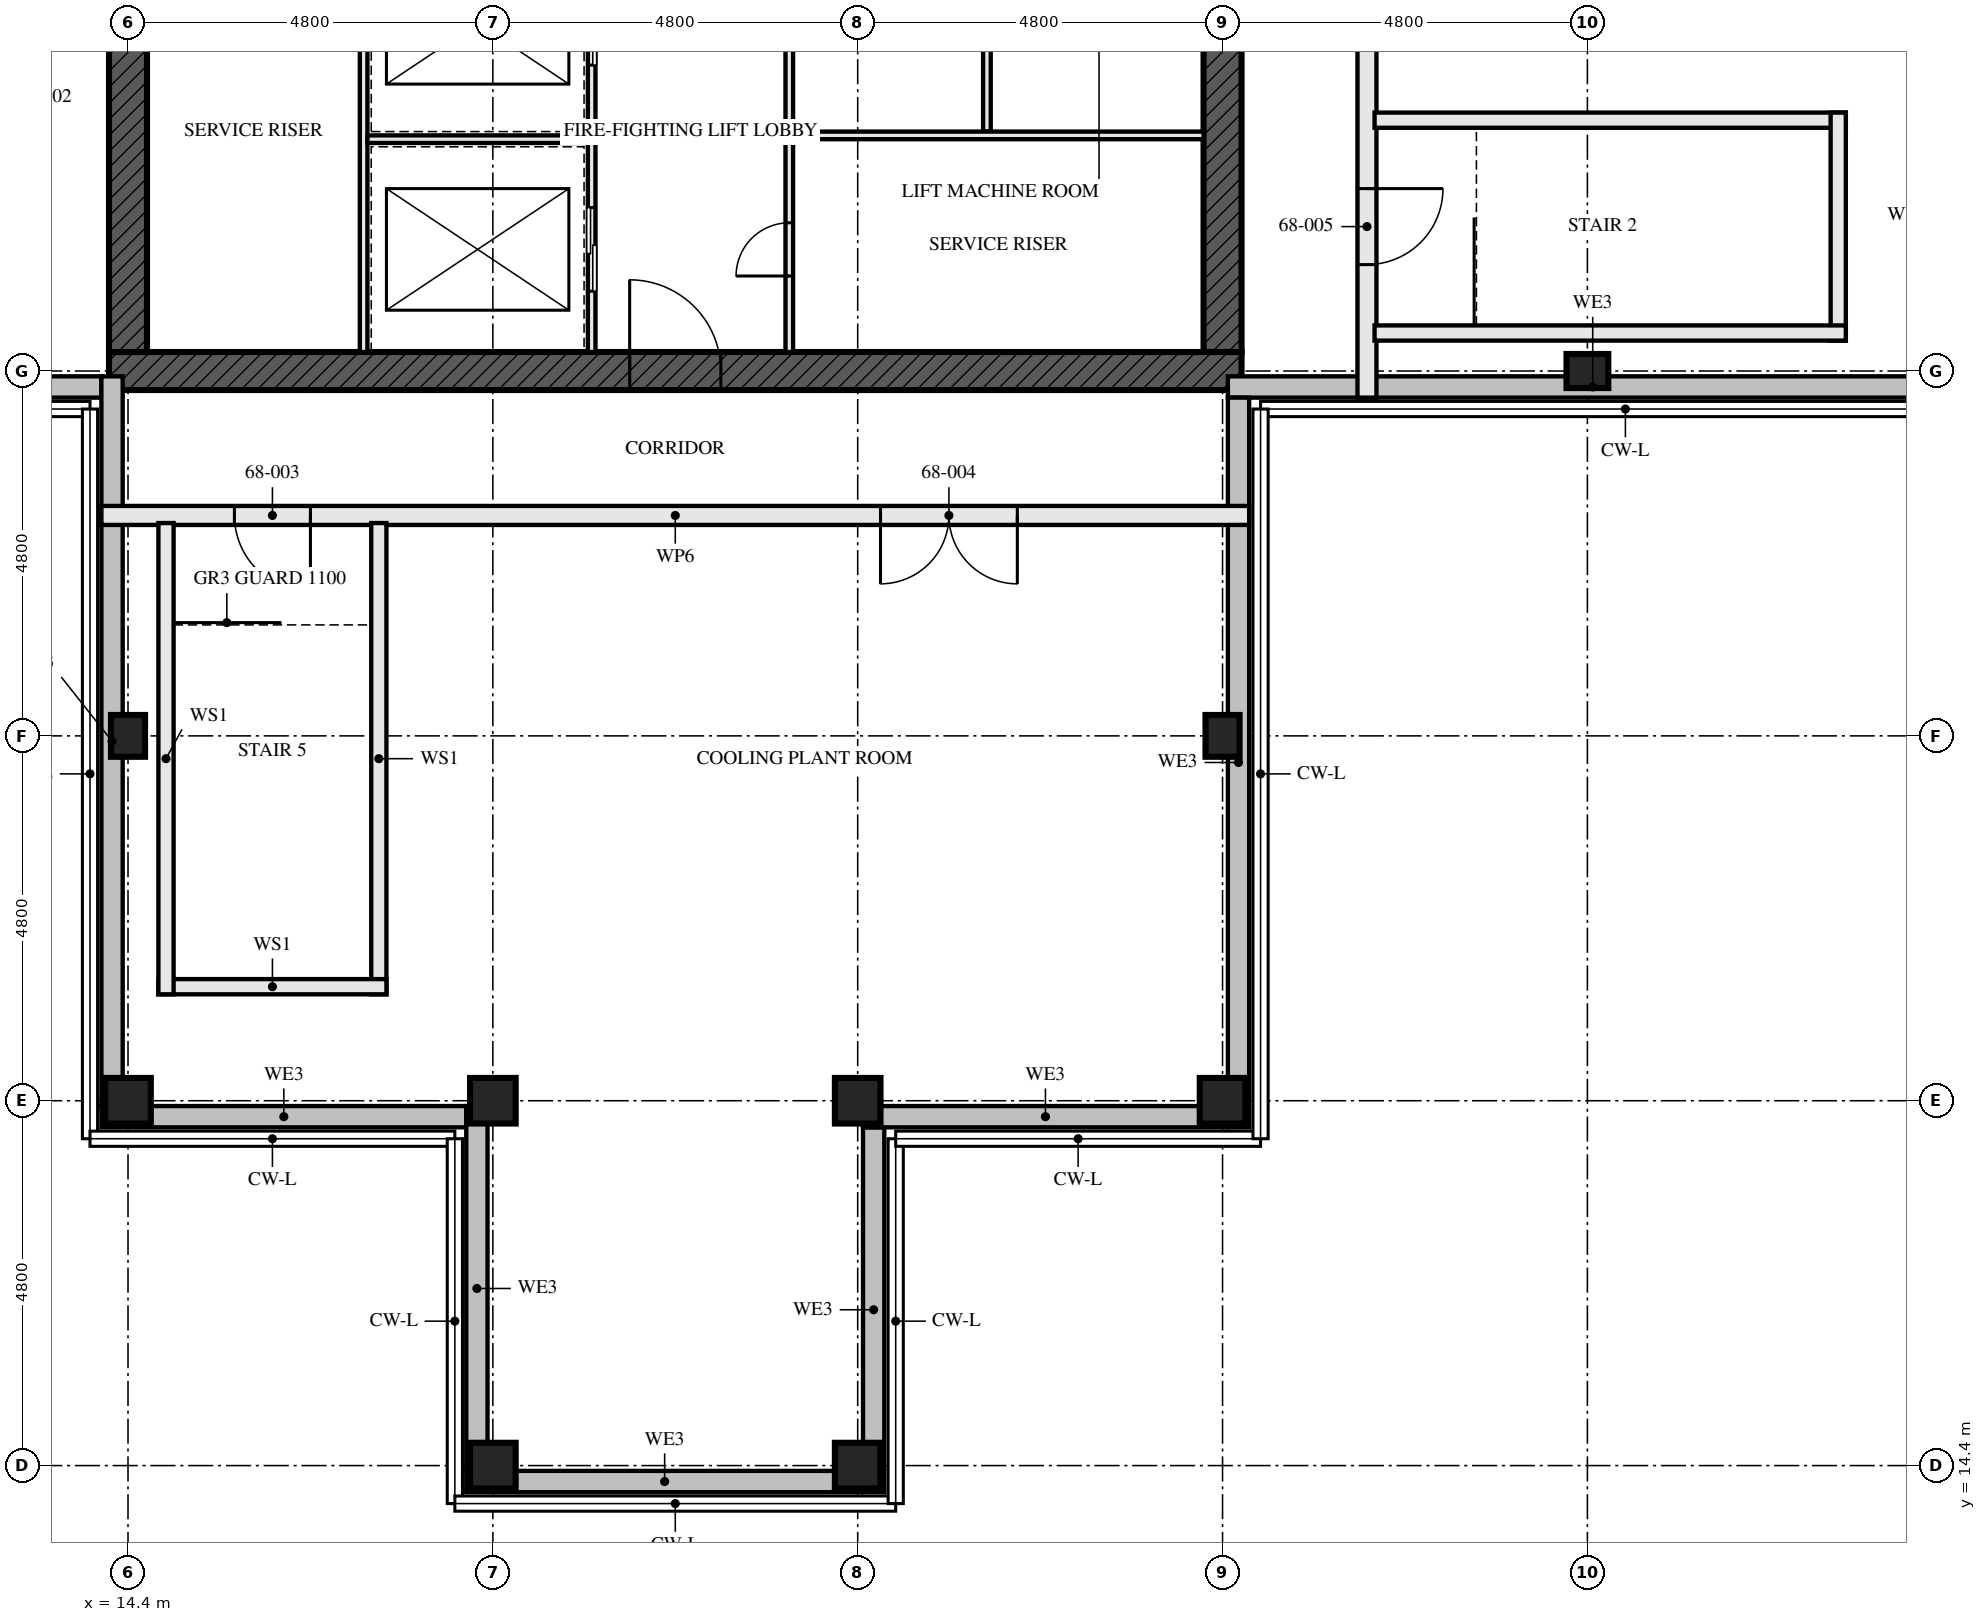
"""IFC4 building model, lengths in metres.
Left out: names, types, materials, properties, quantities, classifications, styles, units other than length and angle.
Written with IfcOpenShell. Run it as: python <this file> out.ifc"""

import sys

from ifc_helpers import new_model, si_unit, direction, frame, frame_2d, origin, origin_2d, place, context, subcontext, project, spatial, rectangle, hollow_rectangle, i_section, extrude, element, fill, save


model = new_model("IFC4")
c1 = context("Model", 3, precision=1e-05, world=origin(), true_north=direction((0.0, 1.0)))
c2 = subcontext(c1, "Body", "Model", "MODEL_VIEW")
j1 = project(units=[si_unit("LENGTHUNIT", "METRE"), si_unit("PLANEANGLEUNIT", "RADIAN")], contexts=[c1])
p1 = place(None, origin())
s1 = spatial("IfcSite", under=j1, at=p1, CompositionType="ELEMENT")
p2 = place(p1, origin())
s2 = spatial("IfcBuilding", under=s1, at=p2, CompositionType="ELEMENT")
p3 = place(p2, frame((0.0, 0.0, 248.0)))
s3 = spatial("IfcBuildingStorey", under=s2, at=p3, CompositionType="ELEMENT", Elevation=248.0)
p4 = place(p3, frame((14.4, 19.2, 0.0), z_axis=(0.0, 0.0, 1.0), x_axis=(0.0, 1.0, 0.0)))
e1 = element("IfcColumn", 1, at=p4, inside=s3, PredefinedType="COLUMN", context=c2, shape_type="SweptSolid", body=[
    extrude(hollow_rectangle(XDim=0.6, YDim=0.6, WallThickness=0.05, at=origin_2d()), origin(), (0.0, 0.0, 1.0), 4.25),
])
p5 = place(p3, frame((14.4, 24.0, 0.0), z_axis=(0.0, 0.0, 1.0), x_axis=(1.0, 0.0, 0.0)))
e2 = element("IfcColumn", 2, at=p5, inside=s3, PredefinedType="COLUMN", context=c2, shape_type="SweptSolid", body=[
    extrude(i_section(OverallWidth=0.448, OverallDepth=0.55, WebThickness=0.072, FlangeThickness=0.115, FilletRadius=0.015, at=origin_2d()), origin(), (0.0, 0.0, 1.0), 4.25),
])
for number, where, z_axis, x_axis in (
    (3, (19.2, 14.4, 0.0), (0.0, 0.0, 1.0), (0.0, 1.0, 0.0)),
    (4, (19.2, 19.2, 0.0), (0.0, 0.0, 1.0), (0.0, 1.0, 0.0)),
    (5, (24.0, 14.4, 0.0), (0.0, 0.0, 1.0), (0.0, 1.0, 0.0)),
    (6, (24.0, 19.2, 0.0), (0.0, 0.0, 1.0), (0.0, 1.0, 0.0)),
    (7, (28.8, 19.2, 0.0), (0.0, 0.0, 1.0), (0.0, 1.0, 0.0)),
):
    element("IfcColumn", number, at=place(p3, frame(where, z_axis=z_axis, x_axis=x_axis)), inside=s3, PredefinedType="COLUMN", context=c2, shape_type="SweptSolid", body=[
        extrude(hollow_rectangle(XDim=0.6, YDim=0.6, WallThickness=0.05, at=origin_2d()), origin(), (0.0, 0.0, 1.0), 4.25),
    ])
for number, where, z_axis, x_axis in (
    (8, (28.8, 24.0, 0.0), (0.0, 0.0, 1.0), (1.0, 0.0, 0.0)),
    (9, (33.6, 28.8, 0.0), (0.0, 0.0, 1.0), (0.0, 1.0, 0.0)),
):
    element("IfcColumn", number, at=place(p3, frame(where, z_axis=z_axis, x_axis=x_axis)), inside=s3, PredefinedType="COLUMN", context=c2, shape_type="SweptSolid", body=[
        extrude(i_section(OverallWidth=0.448, OverallDepth=0.55, WebThickness=0.072, FlangeThickness=0.115, FilletRadius=0.015, at=origin_2d()), origin(), (0.0, 0.0, 1.0), 4.25),
    ])
p6 = place(p3, frame((14.15, 28.8, -0.25), z_axis=(0.0, 0.0, 1.0), x_axis=(1.0, 0.0, 0.0)))
e10 = element("IfcWall", 10, at=p6, inside=s3, PredefinedType="SHEAR", context=c2, shape_type="SweptSolid", body=[
    extrude(rectangle(XDim=14.9, YDim=0.5, at=frame_2d((7.45, 0.0))), origin(), (0.0, 0.0, 1.0), 4.5),
])
p7 = place(p6, frame((6.85, 0.0, 0.25)))
e11 = element("IfcOpeningElement", 11, at=p7, cuts=e10, PredefinedType="OPENING", context=c2, shape_type="SweptSolid", body=[
    extrude(rectangle(XDim=1.2, YDim=2.1, at=frame_2d((0.6, 1.05))), frame((0.0, 0.26, 0.0), z_axis=(0.0, -1.0, 0.0), x_axis=(1.0, 0.0, 0.0)), (0.0, 0.0, 1.0), 0.521),
])
p8 = place(p3, frame((14.4, 42.95, -0.25), z_axis=(0.0, 0.0, 1.0), x_axis=(0.0, -1.0, 0.0)))
e12 = element("IfcWall", 12, at=p8, inside=s3, PredefinedType="SHEAR", context=c2, shape_type="SweptSolid", body=[
    extrude(rectangle(XDim=13.9, YDim=0.5, at=frame_2d((6.95, 0.0))), origin(), (0.0, 0.0, 1.0), 4.5),
])
p9 = place(p8, frame((6.35, 0.0, 0.25)))
e13 = element("IfcOpeningElement", 13, at=p9, cuts=e12, PredefinedType="OPENING", context=c2, shape_type="SweptSolid", body=[
    extrude(rectangle(XDim=1.2, YDim=2.1, at=frame_2d((0.6, 1.05))), frame((0.0, 0.26, 0.0), z_axis=(0.0, -1.0, 0.0), x_axis=(1.0, 0.0, 0.0)), (0.0, 0.0, 1.0), 0.521),
])
p10 = place(p3, frame((28.8, 29.05, -0.25), z_axis=(0.0, 0.0, 1.0), x_axis=(0.0, 1.0, 0.0)))
e14 = element("IfcWall", 14, at=p10, inside=s3, PredefinedType="SHEAR", context=c2, shape_type="SweptSolid", body=[
    extrude(rectangle(XDim=13.9, YDim=0.5, at=frame_2d((6.95, 0.0))), origin(), (0.0, 0.0, 1.0), 4.5),
])
p11 = place(p10, frame((6.35, 0.0, 0.25)))
e15 = element("IfcOpeningElement", 15, at=p11, cuts=e14, PredefinedType="OPENING", context=c2, shape_type="SweptSolid", body=[
    extrude(rectangle(XDim=1.2, YDim=2.1, at=frame_2d((0.6, 1.05))), frame((0.0, 0.26, 0.0), z_axis=(0.0, -1.0, 0.0), x_axis=(1.0, 0.0, 0.0)), (0.0, 0.0, 1.0), 0.521),
])
p12 = place(p3, frame((28.87, 28.59, 4.5), z_axis=(0.0, 0.0, 1.0), x_axis=(1.0, 0.0, 0.0)))
e16 = element("IfcWall", 16, at=p12, inside=s3, PredefinedType="PARAPET", context=c2, shape_type="SweptSolid", body=[
    extrude(rectangle(XDim=9.6, YDim=0.28, at=frame_2d((4.8, 0.0))), origin(), (0.0, 0.0, 1.0), 1.1),
])
for number, where, z_axis, x_axis in (
    (17, (4.45, 28.59, 4.5), (0.0, 0.0, 1.0), (1.0, 0.0, 0.0)),
    (18, (14.19, 28.73, 4.5), (0.0, 0.0, 1.0), (0.0, -1.0, 0.0)),
):
    element("IfcWall", number, at=place(p3, frame(where, z_axis=z_axis, x_axis=x_axis)), inside=s3, PredefinedType="PARAPET", context=c2, shape_type="SweptSolid", body=[
        extrude(rectangle(XDim=9.6, YDim=0.28, at=frame_2d((4.8, 0.0))), origin(), (0.0, 0.0, 1.0), 1.1),
    ])
p13 = place(p3, frame((14.05, 18.99, 4.5), z_axis=(0.0, 0.0, 1.0), x_axis=(1.0, 0.0, 0.0)))
e19 = element("IfcWall", 19, at=p13, inside=s3, PredefinedType="PARAPET", context=c2, shape_type="SweptSolid", body=[
    extrude(rectangle(XDim=4.8, YDim=0.28, at=frame_2d((2.4, 0.0))), origin(), (0.0, 0.0, 1.0), 1.1),
])
p14 = place(p3, frame((18.99, 19.13, 4.5), z_axis=(0.0, 0.0, 1.0), x_axis=(0.0, -1.0, 0.0)))
e20 = element("IfcWall", 20, at=p14, inside=s3, PredefinedType="PARAPET", context=c2, shape_type="SweptSolid", body=[
    extrude(rectangle(XDim=4.8, YDim=0.28, at=frame_2d((2.4, 0.0))), origin(), (0.0, 0.0, 1.0), 1.1),
])
p15 = place(p3, frame((18.85, 14.19, 4.5), z_axis=(0.0, 0.0, 1.0), x_axis=(1.0, 0.0, 0.0)))
e21 = element("IfcWall", 21, at=p15, inside=s3, PredefinedType="PARAPET", context=c2, shape_type="SweptSolid", body=[
    extrude(rectangle(XDim=5.22, YDim=0.28, at=frame_2d((2.61, 0.0))), origin(), (0.0, 0.0, 1.0), 1.1),
])
for number, where, z_axis, x_axis in (
    (22, (24.21, 14.05, 4.5), (0.0, 0.0, 1.0), (0.0, 1.0, 0.0)),
    (23, (24.07, 18.99, 4.5), (0.0, 0.0, 1.0), (1.0, 0.0, 0.0)),
):
    element("IfcWall", number, at=place(p3, frame(where, z_axis=z_axis, x_axis=x_axis)), inside=s3, PredefinedType="PARAPET", context=c2, shape_type="SweptSolid", body=[
        extrude(rectangle(XDim=4.8, YDim=0.28, at=frame_2d((2.4, 0.0))), origin(), (0.0, 0.0, 1.0), 1.1),
    ])
p16 = place(p3, frame((29.01, 18.85, 4.5), z_axis=(0.0, 0.0, 1.0), x_axis=(0.0, 1.0, 0.0)))
e24 = element("IfcWall", 24, at=p16, inside=s3, PredefinedType="PARAPET", context=c2, shape_type="SweptSolid", body=[
    extrude(rectangle(XDim=9.6, YDim=0.28, at=frame_2d((4.8, 0.0))), origin(), (0.0, 0.0, 1.0), 1.1),
])
for number, where, z_axis, x_axis in (
    (25, (14.9, 20.6, 0.0), (0.0, 0.0, 1.0), (0.0, 1.0, 0.0)),
    (26, (17.7, 20.6, 0.0), (0.0, 0.0, 1.0), (0.0, 1.0, 0.0)),
):
    element("IfcWall", number, at=place(p3, frame(where, z_axis=z_axis, x_axis=x_axis)), inside=s3, PredefinedType="SOLIDWALL", context=c2, shape_type="SweptSolid", body=[
        extrude(rectangle(XDim=6.2, YDim=0.2, at=frame_2d((3.1, 0.0))), origin(), (0.0, 0.0, 1.0), 3.478),
    ])
p17 = place(p3, frame((14.8, 20.7, 0.0), z_axis=(0.0, 0.0, 1.0), x_axis=(1.0, 0.0, 0.0)))
e27 = element("IfcWall", 27, at=p17, inside=s3, PredefinedType="SOLIDWALL", context=c2, shape_type="SweptSolid", body=[
    extrude(rectangle(XDim=3.0, YDim=0.2, at=frame_2d((1.5, 0.0))), origin(), (0.0, 0.0, 1.0), 4.25),
])
p18 = place(p3, frame((14.05, 26.9, 0.0), z_axis=(0.0, 0.0, 1.0), x_axis=(1.0, 0.0, 0.0)))
e28 = element("IfcWall", 28, at=p18, inside=s3, PredefinedType="SOLIDWALL", context=c2, shape_type="SweptSolid", body=[
    extrude(rectangle(XDim=15.1, YDim=0.25, at=frame_2d((7.55, 0.0))), origin(), (0.0, 0.0, 1.0), 3.34),
])
p19 = place(p18, frame((1.75, 0.0, 0.0)))
e29 = element("IfcOpeningElement", 29, at=p19, cuts=e28, PredefinedType="OPENING", context=c2, shape_type="SweptSolid", body=[
    extrude(rectangle(XDim=1.0, YDim=2.1, at=frame_2d((0.5, 1.05))), frame((0.0, 0.135, 0.0), z_axis=(0.0, -1.0, 0.0), x_axis=(1.0, 0.0, 0.0)), (0.0, 0.0, 1.0), 0.271),
])
p20 = place(p18, frame((10.25, 0.0, 0.0)))
e30 = element("IfcOpeningElement", 30, at=p20, cuts=e28, PredefinedType="OPENING", context=c2, shape_type="SweptSolid", body=[
    extrude(rectangle(XDim=1.8, YDim=2.4, at=frame_2d((0.9, 1.2))), frame((0.0, 0.135, 0.0), z_axis=(0.0, -1.0, 0.0), x_axis=(1.0, 0.0, 0.0)), (0.0, 0.0, 1.0), 0.271),
])
for number, where, z_axis, x_axis in (
    (31, (37.0, 29.3, 0.0), (0.0, 0.0, 1.0), (-1.0, 0.0, 0.0)),
    (32, (37.0, 32.1, 0.0), (0.0, 0.0, 1.0), (-1.0, 0.0, 0.0)),
):
    element("IfcWall", number, at=place(p3, frame(where, z_axis=z_axis, x_axis=x_axis)), inside=s3, PredefinedType="SOLIDWALL", context=c2, shape_type="SweptSolid", body=[
        extrude(rectangle(XDim=6.2, YDim=0.2, at=frame_2d((3.1, 0.0))), origin(), (0.0, 0.0, 1.0), 4.25),
    ])
p21 = place(p3, frame((36.9, 29.2, 0.0), z_axis=(0.0, 0.0, 1.0), x_axis=(0.0, 1.0, 0.0)))
e33 = element("IfcWall", 33, at=p21, inside=s3, PredefinedType="SOLIDWALL", context=c2, shape_type="SweptSolid", body=[
    extrude(rectangle(XDim=3.0, YDim=0.2, at=frame_2d((1.5, 0.0))), origin(), (0.0, 0.0, 1.0), 4.25),
])
p22 = place(p3, frame((30.7, 28.45, 0.0), z_axis=(0.0, 0.0, 1.0), x_axis=(0.0, 1.0, 0.0)))
e34 = element("IfcWall", 34, at=p22, inside=s3, PredefinedType="SOLIDWALL", context=c2, shape_type="SweptSolid", body=[
    extrude(rectangle(XDim=15.1, YDim=0.25, at=frame_2d((7.55, 0.0))), origin(), (0.0, 0.0, 1.0), 3.34),
])
p23 = place(p22, frame((1.75, 0.0, 0.0)))
e35 = element("IfcOpeningElement", 35, at=p23, cuts=e34, PredefinedType="OPENING", context=c2, shape_type="SweptSolid", body=[
    extrude(rectangle(XDim=1.0, YDim=2.1, at=frame_2d((0.5, 1.05))), frame((0.0, 0.135, 0.0), z_axis=(0.0, -1.0, 0.0), x_axis=(1.0, 0.0, 0.0)), (0.0, 0.0, 1.0), 0.271),
])
p24 = place(p22, frame((10.25, 0.0, 0.0)))
e36 = element("IfcOpeningElement", 36, at=p24, cuts=e34, PredefinedType="OPENING", context=c2, shape_type="SweptSolid", body=[
    extrude(rectangle(XDim=1.8, YDim=2.4, at=frame_2d((0.9, 1.2))), frame((0.0, 0.135, 0.0), z_axis=(0.0, -1.0, 0.0), x_axis=(1.0, 0.0, 0.0)), (0.0, 0.0, 1.0), 0.271),
])
p25 = place(p3, frame((20.5, 29.05, 0.0), z_axis=(0.0, 0.0, 1.0), x_axis=(0.0, 1.0, 0.0)))
e37 = element("IfcWall", 37, at=p25, inside=s3, PredefinedType="SOLIDWALL", context=c2, shape_type="SweptSolid", body=[
    extrude(rectangle(XDim=5.8, YDim=0.1, at=frame_2d((2.9, 0.0))), origin(), (0.0, 0.0, 1.0), 4.25),
])
p26 = place(p25, frame((0.8, 0.0, 0.0)))
e38 = element("IfcOpeningElement", 38, at=p26, cuts=e37, PredefinedType="OPENING", context=c2, shape_type="SweptSolid", body=[
    extrude(rectangle(XDim=1.1, YDim=2.3, at=frame_2d((0.55, 1.15))), frame((0.0, 0.061, 0.0), z_axis=(0.0, -1.0, 0.0), x_axis=(1.0, 0.0, 0.0)), (0.0, 0.0, 1.0), 0.121),
])
p27 = place(p25, frame((3.775, 0.0, 0.0)))
e39 = element("IfcOpeningElement", 39, at=p27, cuts=e37, PredefinedType="OPENING", context=c2, shape_type="SweptSolid", body=[
    extrude(rectangle(XDim=1.1, YDim=2.3, at=frame_2d((0.55, 1.15))), frame((0.0, 0.061, 0.0), z_axis=(0.0, -1.0, 0.0), x_axis=(1.0, 0.0, 0.0)), (0.0, 0.0, 1.0), 0.121),
])
p28 = place(p3, frame((23.1, 29.05, 0.0), z_axis=(0.0, 0.0, 1.0), x_axis=(0.0, 1.0, 0.0)))
e40 = element("IfcWall", 40, at=p28, inside=s3, PredefinedType="SOLIDWALL", context=c2, shape_type="SweptSolid", body=[
    extrude(rectangle(XDim=5.8, YDim=0.1, at=frame_2d((2.9, 0.0))), origin(), (0.0, 0.0, 1.0), 4.25),
])
p29 = place(p28, frame((1.0, 0.0, 0.0)))
e41 = element("IfcOpeningElement", 41, at=p29, cuts=e40, PredefinedType="OPENING", context=c2, shape_type="SweptSolid", body=[
    extrude(rectangle(XDim=0.7, YDim=2.1, at=frame_2d((0.35, 1.05))), frame((0.0, 0.061, 0.0), z_axis=(0.0, -1.0, 0.0), x_axis=(1.0, 0.0, 0.0)), (0.0, 0.0, 1.0), 0.121),
])
p30 = place(p3, frame((17.5, 29.05, 0.0), z_axis=(0.0, 0.0, 1.0), x_axis=(0.0, 1.0, 0.0)))
e42 = element("IfcWall", 42, at=p30, inside=s3, PredefinedType="SOLIDWALL", context=c2, shape_type="SweptSolid", body=[
    extrude(rectangle(XDim=5.8, YDim=0.1, at=frame_2d((2.9, 0.0))), origin(), (0.0, 0.0, 1.0), 4.25),
])
p31 = place(p3, frame((17.55, 31.85, 0.0), z_axis=(0.0, 0.0, 1.0), x_axis=(1.0, 0.0, 0.0)))
e43 = element("IfcWall", 43, at=p31, inside=s3, PredefinedType="SOLIDWALL", context=c2, shape_type="SweptSolid", body=[
    extrude(rectangle(XDim=2.9, YDim=0.1, at=frame_2d((1.45, 0.0))), origin(), (0.0, 0.0, 1.0), 4.25),
])
p32 = place(p3, frame((25.7, 31.95, 0.0), z_axis=(0.0, 0.0, 1.0), x_axis=(0.0, 1.0, 0.0)))
e44 = element("IfcWall", 44, at=p32, inside=s3, PredefinedType="SOLIDWALL", context=c2, shape_type="SweptSolid", body=[
    extrude(rectangle(XDim=2.9, YDim=0.1, at=frame_2d((1.45, 0.0))), origin(), (0.0, 0.0, 1.0), 4.25),
])
p33 = place(p3, frame((23.15, 31.9, 0.0), z_axis=(0.0, 0.0, 1.0), x_axis=(1.0, 0.0, 0.0)))
e45 = element("IfcWall", 45, at=p33, inside=s3, PredefinedType="SOLIDWALL", context=c2, shape_type="SweptSolid", body=[
    extrude(rectangle(XDim=5.4, YDim=0.1, at=frame_2d((2.7, 0.0))), origin(), (0.0, 0.0, 1.0), 4.25),
])
p34 = place(p19, frame((1.0, 0.0, 0.0), z_axis=(0.0, 0.0, 1.0), x_axis=(-1.0, 0.0, 0.0)))
e46 = element("IfcDoor", 46, at=p34, inside=s3, OperationType="SINGLE_SWING_RIGHT", PredefinedType="DOOR", context=c2, shape_type="SweptSolid", body=[
    extrude(rectangle(XDim=1.0, YDim=2.1, at=frame_2d((0.5, 1.05))), frame((0.0, 0.032, 0.0), z_axis=(0.0, -1.0, 0.0), x_axis=(1.0, 0.0, 0.0)), (0.0, 0.0, 1.0), 0.064),
])
fill(e29, e46)
p35 = place(p20, frame((1.8, 0.0, 0.0), z_axis=(0.0, 0.0, 1.0), x_axis=(-1.0, 0.0, 0.0)))
e47 = element("IfcDoor", 47, at=p35, inside=s3, OperationType="DOUBLE_DOOR_SINGLE_SWING", PredefinedType="DOOR", context=c2, shape_type="SweptSolid", body=[
    extrude(rectangle(XDim=1.8, YDim=2.4, at=frame_2d((0.9, 1.2))), frame((0.0, 0.032, 0.0), z_axis=(0.0, -1.0, 0.0), x_axis=(1.0, 0.0, 0.0)), (0.0, 0.0, 1.0), 0.064),
])
fill(e30, e47)
p36 = place(p23, frame((1.0, 0.0, 0.0), z_axis=(0.0, 0.0, 1.0), x_axis=(-1.0, 0.0, 0.0)))
e48 = element("IfcDoor", 48, at=p36, inside=s3, OperationType="SINGLE_SWING_RIGHT", PredefinedType="DOOR", context=c2, shape_type="SweptSolid", body=[
    extrude(rectangle(XDim=1.0, YDim=2.1, at=frame_2d((0.5, 1.05))), frame((0.0, 0.032, 0.0), z_axis=(0.0, -1.0, 0.0), x_axis=(1.0, 0.0, 0.0)), (0.0, 0.0, 1.0), 0.064),
])
fill(e35, e48)
p37 = place(p26, origin())
e49 = element("IfcDoor", 49, at=p37, inside=s3, OperationType="SLIDING_TO_LEFT", PredefinedType="DOOR", context=c2, shape_type="SweptSolid", body=[
    extrude(rectangle(XDim=1.1, YDim=2.3, at=frame_2d((0.55, 1.15))), frame((0.0, 0.05, 0.0), z_axis=(0.0, -1.0, 0.0), x_axis=(1.0, 0.0, 0.0)), (0.0, 0.0, 1.0), 0.1),
])
fill(e38, e49)
p38 = place(p27, origin())
e50 = element("IfcDoor", 50, at=p38, inside=s3, OperationType="SLIDING_TO_LEFT", PredefinedType="DOOR", context=c2, shape_type="SweptSolid", body=[
    extrude(rectangle(XDim=1.1, YDim=2.3, at=frame_2d((0.55, 1.15))), frame((0.0, 0.05, 0.0), z_axis=(0.0, -1.0, 0.0), x_axis=(1.0, 0.0, 0.0)), (0.0, 0.0, 1.0), 0.1),
])
fill(e39, e50)
p39 = place(p29, origin())
e51 = element("IfcDoor", 51, at=p39, inside=s3, OperationType="SINGLE_SWING_RIGHT", PredefinedType="DOOR", context=c2, shape_type="SweptSolid", body=[
    extrude(rectangle(XDim=0.7, YDim=2.1, at=frame_2d((0.35, 1.05))), frame((0.0, 0.027, 0.0), z_axis=(0.0, -1.0, 0.0), x_axis=(1.0, 0.0, 0.0)), (0.0, 0.0, 1.0), 0.054),
])
fill(e41, e51)
p40 = place(p7, origin())
e52 = element("IfcDoor", 52, at=p40, inside=s3, OperationType="SINGLE_SWING_LEFT", PredefinedType="DOOR", context=c2, shape_type="SweptSolid", body=[
    extrude(rectangle(XDim=1.2, YDim=2.1, at=frame_2d((0.6, 1.05))), frame((0.0, 0.027, 0.0), z_axis=(0.0, -1.0, 0.0), x_axis=(1.0, 0.0, 0.0)), (0.0, 0.0, 1.0), 0.054),
])
fill(e11, e52)
save(model, sys.argv[1])
